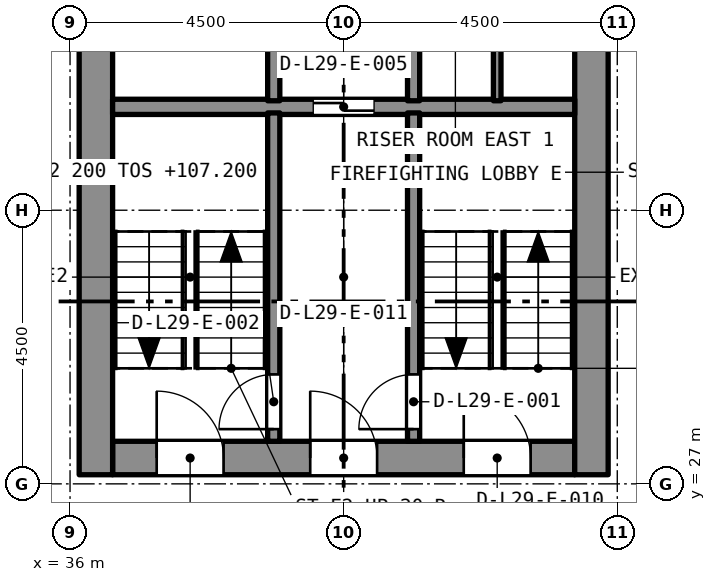
"""IFC4 building model, lengths in metres.
Left out: names, types, materials, properties, quantities, classifications, styles, units other than length and angle.
Written with IfcOpenShell. Run it as: python <this file> out.ifc"""

import sys

from ifc_helpers import new_model, si_unit, direction, frame, frame_2d, origin, place, context, subcontext, project, spatial, rectangle, extrude, element, fill, save


model = new_model("IFC4")
c1 = context("Model", 3, precision=1e-05, world=origin(), true_north=direction((0.0, 1.0)))
c2 = subcontext(c1, "Body", "Model", "MODEL_VIEW")
j1 = project(units=[si_unit("LENGTHUNIT", "METRE"), si_unit("PLANEANGLEUNIT", "RADIAN")], contexts=[c1])
p1 = place(None, origin())
s1 = spatial("IfcSite", under=j1, at=p1, CompositionType="ELEMENT")
p2 = place(p1, origin())
s2 = spatial("IfcBuilding", under=s1, at=p2, CompositionType="ELEMENT")
p3 = place(p2, frame((0.0, 0.0, 105.6)))
s3 = spatial("IfcBuildingStorey", under=s2, at=p3, CompositionType="ELEMENT", Elevation=105.6)
p4 = place(p3, frame((36.7, 27.425, 0.0), z_axis=(0.0, 0.0, 1.0), x_axis=(1.0, 0.0, 0.0)))
e1 = element("IfcWall", 1, at=p4, inside=s3, PredefinedType="SOLIDWALL", context=c2, shape_type="SweptSolid", body=[
    extrude(rectangle(XDim=7.6, YDim=0.55, at=frame_2d((3.8, 0.0))), origin(), (0.0, 0.0, 1.0), 3.2),
])
p5 = place(p4, frame((5.775, 0.0, 0.0)))
e2 = element("IfcOpeningElement", 2, at=p5, cuts=e1, PredefinedType="OPENING", context=c2, shape_type="SweptSolid", body=[
    extrude(rectangle(XDim=1.1, YDim=2.1, at=frame_2d((0.55, 1.05))), frame((0.0, 0.285, 0.0), z_axis=(0.0, -1.0, 0.0), x_axis=(1.0, 0.0, 0.0)), (0.0, 0.0, 1.0), 0.57),
])
p6 = place(p4, frame((3.25, 0.0, 0.0)))
e3 = element("IfcOpeningElement", 3, at=p6, cuts=e1, PredefinedType="OPENING", context=c2, shape_type="SweptSolid", body=[
    extrude(rectangle(XDim=1.1, YDim=2.1, at=frame_2d((0.55, 1.05))), frame((0.0, 0.285, 0.0), z_axis=(0.0, -1.0, 0.0), x_axis=(1.0, 0.0, 0.0)), (0.0, 0.0, 1.0), 0.57),
])
p7 = place(p4, frame((0.725, 0.0, 0.0)))
e4 = element("IfcOpeningElement", 4, at=p7, cuts=e1, PredefinedType="OPENING", context=c2, shape_type="SweptSolid", body=[
    extrude(rectangle(XDim=1.1, YDim=2.1, at=frame_2d((0.55, 1.05))), frame((0.0, 0.285, 0.0), z_axis=(0.0, -1.0, 0.0), x_axis=(1.0, 0.0, 0.0)), (0.0, 0.0, 1.0), 0.57),
])
p8 = place(p3, frame((36.425, 27.15, 0.0), z_axis=(0.0, 0.0, 1.0), x_axis=(0.0, 1.0, 0.0)))
e5 = element("IfcWall", 5, at=p8, inside=s3, PredefinedType="SOLIDWALL", context=c2, shape_type="SweptSolid", body=[
    extrude(rectangle(XDim=13.2, YDim=0.55, at=frame_2d((6.6, 0.0))), origin(), (0.0, 0.0, 1.0), 3.2),
])
p9 = place(p8, frame((8.8, 0.0, 0.0)))
e6 = element("IfcOpeningElement", 6, at=p9, cuts=e5, PredefinedType="OPENING", context=c2, shape_type="SweptSolid", body=[
    extrude(rectangle(XDim=1.2, YDim=2.1, at=frame_2d((0.6, 1.05))), frame((0.0, 0.285, 0.0), z_axis=(0.0, -1.0, 0.0), x_axis=(1.0, 0.0, 0.0)), (0.0, 0.0, 1.0), 0.57),
])
p10 = place(p3, frame((44.575, 27.15, 0.0), z_axis=(0.0, 0.0, 1.0), x_axis=(0.0, 1.0, 0.0)))
e7 = element("IfcWall", 7, at=p10, inside=s3, PredefinedType="SOLIDWALL", context=c2, shape_type="SweptSolid", body=[
    extrude(rectangle(XDim=13.2, YDim=0.55, at=frame_2d((6.6, 0.0))), origin(), (0.0, 0.0, 1.0), 3.2),
])
p11 = place(p10, frame((8.8, 0.0, 0.0)))
e8 = element("IfcOpeningElement", 8, at=p11, cuts=e7, PredefinedType="OPENING", context=c2, shape_type="SweptSolid", body=[
    extrude(rectangle(XDim=1.2, YDim=2.1, at=frame_2d((0.6, 1.05))), frame((0.0, 0.285, 0.0), z_axis=(0.0, -1.0, 0.0), x_axis=(1.0, 0.0, 0.0)), (0.0, 0.0, 1.0), 0.57),
])
p12 = place(p3, frame((36.7, 33.2, 0.0), z_axis=(0.0, 0.0, 1.0), x_axis=(1.0, 0.0, 0.0)))
e9 = element("IfcWall", 9, at=p12, inside=s3, PredefinedType="SOLIDWALL", context=c2, shape_type="SweptSolid", body=[
    extrude(rectangle(XDim=7.6, YDim=0.25, at=frame_2d((3.8, 0.0))), origin(), (0.0, 0.0, 1.0), 2.9),
])
p13 = place(p12, frame((3.3, 0.0, 0.0)))
e10 = element("IfcOpeningElement", 10, at=p13, cuts=e9, PredefinedType="OPENING", context=c2, shape_type="SweptSolid", body=[
    extrude(rectangle(XDim=1.0, YDim=2.1, at=frame_2d((0.5, 1.05))), frame((0.0, 0.135, 0.0), z_axis=(0.0, -1.0, 0.0), x_axis=(1.0, 0.0, 0.0)), (0.0, 0.0, 1.0), 0.27),
])
p14 = place(p3, frame((41.65, 27.7, 0.0), z_axis=(0.0, 0.0, 1.0), x_axis=(0.0, 1.0, 0.0)))
e11 = element("IfcWall", 11, at=p14, inside=s3, PredefinedType="SOLIDWALL", context=c2, shape_type="SweptSolid", body=[
    extrude(rectangle(XDim=5.4, YDim=0.2, at=frame_2d((2.7, 0.0))), origin(), (0.0, 0.0, 1.0), 2.9),
])
p15 = place(p14, frame((0.2, 0.0, 0.0)))
e12 = element("IfcOpeningElement", 12, at=p15, cuts=e11, PredefinedType="OPENING", context=c2, shape_type="SweptSolid", body=[
    extrude(rectangle(XDim=0.9, YDim=2.1, at=frame_2d((0.45, 1.05))), frame((0.0, 0.11, 0.0), z_axis=(0.0, -1.0, 0.0), x_axis=(1.0, 0.0, 0.0)), (0.0, 0.0, 1.0), 0.22),
])
p16 = place(p3, frame((39.35, 27.7, 0.0), z_axis=(0.0, 0.0, 1.0), x_axis=(0.0, 1.0, 0.0)))
e13 = element("IfcWall", 13, at=p16, inside=s3, PredefinedType="SOLIDWALL", context=c2, shape_type="SweptSolid", body=[
    extrude(rectangle(XDim=5.4, YDim=0.2, at=frame_2d((2.7, 0.0))), origin(), (0.0, 0.0, 1.0), 2.9),
])
p17 = place(p16, frame((0.2, 0.0, 0.0)))
e14 = element("IfcOpeningElement", 14, at=p17, cuts=e13, PredefinedType="OPENING", context=c2, shape_type="SweptSolid", body=[
    extrude(rectangle(XDim=0.9, YDim=2.1, at=frame_2d((0.45, 1.05))), frame((0.0, 0.11, 0.0), z_axis=(0.0, -1.0, 0.0), x_axis=(1.0, 0.0, 0.0)), (0.0, 0.0, 1.0), 0.22),
])
for number, where, z_axis, x_axis in (
    (15, (41.65, 33.3, 0.0), (0.0, 0.0, 1.0), (0.0, 1.0, 0.0)),
    (16, (39.35, 33.3, 0.0), (0.0, 0.0, 1.0), (0.0, 1.0, 0.0)),
):
    element("IfcWall", number, at=place(p3, frame(where, z_axis=z_axis, x_axis=x_axis)), inside=s3, PredefinedType="SOLIDWALL", context=c2, shape_type="SweptSolid", body=[
        extrude(rectangle(XDim=2.3, YDim=0.2, at=frame_2d((1.15, 0.0))), origin(), (0.0, 0.0, 1.0), 2.9),
    ])
p18 = place(p3, frame((43.025, 33.3, 0.0), z_axis=(0.0, 0.0, 1.0), x_axis=(0.0, 1.0, 0.0)))
e17 = element("IfcWall", 17, at=p18, inside=s3, PredefinedType="PARTITIONING", context=c2, shape_type="SweptSolid", body=[
    extrude(rectangle(XDim=2.3, YDim=0.125, at=frame_2d((1.15, 0.0))), origin(), (0.0, 0.0, 1.0), 2.9),
])
p19 = place(p15, origin())
e18 = element("IfcDoor", 18, at=p19, inside=s3, OperationType="SINGLE_SWING_LEFT", PredefinedType="DOOR", context=c2, shape_type="SweptSolid", body=[
    extrude(rectangle(XDim=0.9, YDim=2.1, at=frame_2d((0.45, 1.05))), frame((0.0, 0.025, 0.0), z_axis=(0.0, -1.0, 0.0), x_axis=(1.0, 0.0, 0.0)), (0.0, 0.0, 1.0), 0.05),
])
fill(e12, e18)
p20 = place(p17, origin())
e19 = element("IfcDoor", 19, at=p20, inside=s3, OperationType="SINGLE_SWING_LEFT", PredefinedType="DOOR", context=c2, shape_type="SweptSolid", body=[
    extrude(rectangle(XDim=0.9, YDim=2.1, at=frame_2d((0.45, 1.05))), frame((0.0, 0.025, 0.0), z_axis=(0.0, -1.0, 0.0), x_axis=(1.0, 0.0, 0.0)), (0.0, 0.0, 1.0), 0.05),
])
fill(e14, e19)
p21 = place(p13, origin())
e20 = element("IfcDoor", 20, at=p21, inside=s3, OperationType="SLIDING_TO_LEFT", PredefinedType="DOOR", context=c2, shape_type="SweptSolid", body=[
    extrude(rectangle(XDim=1.0, YDim=2.1, at=frame_2d((0.5, 1.05))), frame((0.0, 0.025, 0.0), z_axis=(0.0, -1.0, 0.0), x_axis=(1.0, 0.0, 0.0)), (0.0, 0.0, 1.0), 0.05),
])
fill(e10, e20)
p22 = place(p5, origin())
e21 = element("IfcDoor", 21, at=p22, inside=s3, OperationType="SINGLE_SWING_LEFT", PredefinedType="DOOR", context=c2, shape_type="SweptSolid", body=[
    extrude(rectangle(XDim=1.1, YDim=2.1, at=frame_2d((0.55, 1.05))), frame((0.0, 0.025, 0.0), z_axis=(0.0, -1.0, 0.0), x_axis=(1.0, 0.0, 0.0)), (0.0, 0.0, 1.0), 0.05),
])
fill(e2, e21)
p23 = place(p6, origin())
e22 = element("IfcDoor", 22, at=p23, inside=s3, OperationType="SINGLE_SWING_LEFT", PredefinedType="DOOR", context=c2, shape_type="SweptSolid", body=[
    extrude(rectangle(XDim=1.1, YDim=2.1, at=frame_2d((0.55, 1.05))), frame((0.0, 0.025, 0.0), z_axis=(0.0, -1.0, 0.0), x_axis=(1.0, 0.0, 0.0)), (0.0, 0.0, 1.0), 0.05),
])
fill(e3, e22)
p24 = place(p7, origin())
e23 = element("IfcDoor", 23, at=p24, inside=s3, OperationType="SINGLE_SWING_LEFT", PredefinedType="DOOR", context=c2, shape_type="SweptSolid", body=[
    extrude(rectangle(XDim=1.1, YDim=2.1, at=frame_2d((0.55, 1.05))), frame((0.0, 0.025, 0.0), z_axis=(0.0, -1.0, 0.0), x_axis=(1.0, 0.0, 0.0)), (0.0, 0.0, 1.0), 0.05),
])
fill(e4, e23)
save(model, sys.argv[1])
